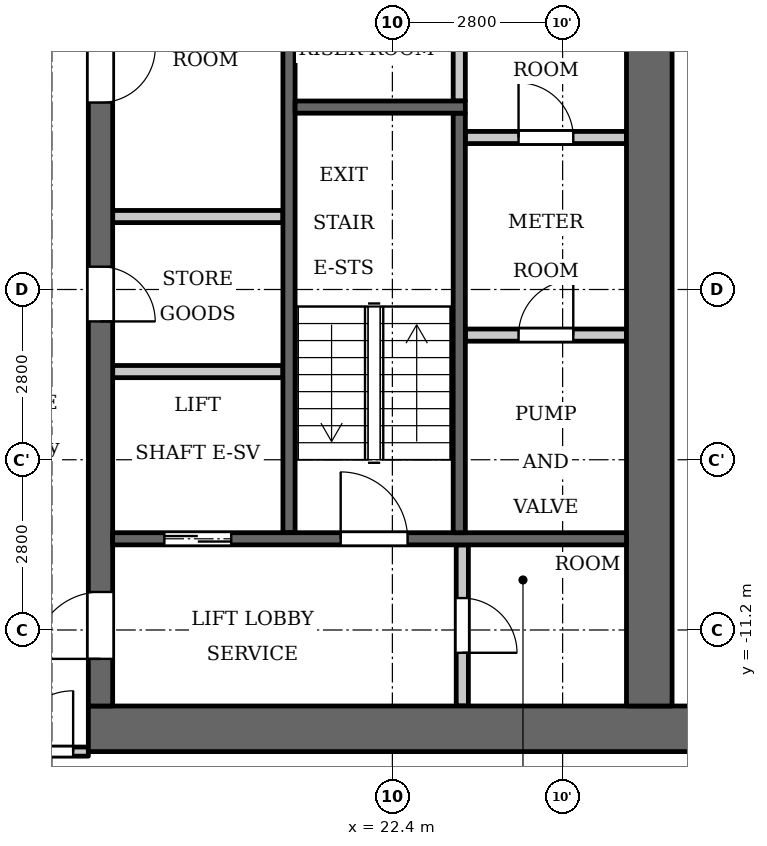
"""IFC4 building model, lengths in metres.
Left out: names, types, materials, properties, quantities, classifications, styles, units other than length and angle.
Written with IfcOpenShell. Run it as: python <this file> out.ifc"""

import sys

from ifc_helpers import new_model, si_unit, direction, frame, frame_2d, origin, place, context, subcontext, project, spatial, rectangle, extrude, element, fill, save


model = new_model("IFC4")
c1 = context("Model", 3, precision=1e-05, world=origin(), true_north=direction((0.0, 1.0)))
c2 = subcontext(c1, "Body", "Model", "MODEL_VIEW")
j1 = project(units=[si_unit("LENGTHUNIT", "METRE"), si_unit("PLANEANGLEUNIT", "RADIAN")], contexts=[c1])
p1 = place(None, origin())
s1 = spatial("IfcSite", under=j1, at=p1, CompositionType="ELEMENT")
p2 = place(p1, origin())
s2 = spatial("IfcBuilding", under=s1, at=p2, CompositionType="ELEMENT")
p3 = place(p2, frame((0.0, 0.0, 146.6)))
s3 = spatial("IfcBuildingStorey", under=s2, at=p3, CompositionType="ELEMENT", Elevation=146.6)
p4 = place(p3, frame((23.5, -2.5, 0.0), z_axis=(0.0, 0.0, 1.0), x_axis=(0.0, 1.0, 0.0)))
e1 = element("IfcWall", 1, at=p4, inside=s3, PredefinedType="PARTITIONING", context=c2, shape_type="SweptSolid", body=[
    extrude(rectangle(XDim=2.65, YDim=0.2, at=frame_2d((1.325, 0.0))), origin(), (0.0, 0.0, 1.0), 3.2),
])
p5 = place(p3, frame((20.7, -9.6, 0.0), z_axis=(0.0, 0.0, 1.0), x_axis=(0.0, 1.0, 0.0)))
e2 = element("IfcWall", 2, at=p5, inside=s3, PredefinedType="SHEAR", context=c2, shape_type="SweptSolid", body=[
    extrude(rectangle(XDim=9.75, YDim=0.2, at=frame_2d((4.875, 0.0))), origin(), (0.0, 0.0, 1.0), 3.2),
])
p6 = place(p3, frame((17.4, -12.825, 0.0), z_axis=(0.0, 0.0, 1.0), x_axis=(1.0, 0.0, 0.0)))
e3 = element("IfcWall", 3, at=p6, inside=s3, PredefinedType="SHEAR", context=c2, shape_type="SweptSolid", body=[
    extrude(rectangle(XDim=10.4, YDim=0.75, at=frame_2d((5.2, 0.0))), origin(), (0.0, 0.0, 1.0), 3.2),
])
p7 = place(p3, frame((17.8, -4.4, 0.0), z_axis=(0.0, 0.0, 1.0), x_axis=(1.0, 0.0, 0.0)))
e4 = element("IfcWall", 4, at=p7, inside=s3, PredefinedType="PARTITIONING", context=c2, shape_type="SweptSolid", body=[
    extrude(rectangle(XDim=2.8, YDim=0.2, at=frame_2d((1.4, 0.0))), origin(), (0.0, 0.0, 1.0), 3.2),
])
p8 = place(p3, frame((17.6, -12.45, 0.0), z_axis=(0.0, 0.0, 1.0), x_axis=(0.0, 1.0, 0.0)))
e5 = element("IfcWall", 5, at=p8, inside=s3, PredefinedType="SHEAR", context=c2, shape_type="SweptSolid", body=[
    extrude(rectangle(XDim=24.9, YDim=0.4, at=frame_2d((12.45, 0.0))), origin(), (0.0, 0.0, 1.0), 3.2),
])
p9 = place(p8, frame((6.325, 0.0, 0.0)))
e6 = element("IfcOpeningElement", 6, at=p9, cuts=e5, PredefinedType="OPENING", context=c2, shape_type="SweptSolid", body=[
    extrude(rectangle(XDim=0.9, YDim=2.1, at=frame_2d((0.45, 1.05))), frame((0.0, 0.21, 0.0), z_axis=(0.0, -1.0, 0.0), x_axis=(1.0, 0.0, 0.0)), (0.0, 0.0, 1.0), 0.42),
])
p10 = place(p8, frame((9.925, 0.0, 0.0)))
e7 = element("IfcOpeningElement", 7, at=p10, cuts=e5, PredefinedType="OPENING", context=c2, shape_type="SweptSolid", body=[
    extrude(rectangle(XDim=0.9, YDim=2.1, at=frame_2d((0.45, 1.05))), frame((0.0, 0.21, 0.0), z_axis=(0.0, -1.0, 0.0), x_axis=(1.0, 0.0, 0.0)), (0.0, 0.0, 1.0), 0.42),
])
p11 = place(p8, frame((15.6, 0.0, 0.0)))
e8 = element("IfcOpeningElement", 8, at=p11, cuts=e5, PredefinedType="OPENING", context=c2, shape_type="SweptSolid", body=[
    extrude(rectangle(XDim=1.1, YDim=2.1, at=frame_2d((0.55, 1.05))), frame((0.0, 0.21, 0.0), z_axis=(0.0, -1.0, 0.0), x_axis=(1.0, 0.0, 0.0)), (0.0, 0.0, 1.0), 0.42),
])
p12 = place(p8, frame((18.0, 0.0, 0.0)))
e9 = element("IfcOpeningElement", 9, at=p12, cuts=e5, PredefinedType="OPENING", context=c2, shape_type="SweptSolid", body=[
    extrude(rectangle(XDim=1.1, YDim=2.1, at=frame_2d((0.55, 1.05))), frame((0.0, 0.21, 0.0), z_axis=(0.0, -1.0, 0.0), x_axis=(1.0, 0.0, 0.0)), (0.0, 0.0, 1.0), 0.42),
])
p13 = place(p8, frame((23.025, 0.0, 0.0)))
e10 = element("IfcOpeningElement", 10, at=p13, cuts=e5, PredefinedType="OPENING", context=c2, shape_type="SweptSolid", body=[
    extrude(rectangle(XDim=1.1, YDim=2.1, at=frame_2d((0.55, 1.05))), frame((0.0, 0.21, 0.0), z_axis=(0.0, -1.0, 0.0), x_axis=(1.0, 0.0, 0.0)), (0.0, 0.0, 1.0), 0.42),
])
p14 = place(p8, frame((0.775, 0.0, 0.0)))
e11 = element("IfcOpeningElement", 11, at=p14, cuts=e5, PredefinedType="OPENING", context=c2, shape_type="SweptSolid", body=[
    extrude(rectangle(XDim=1.1, YDim=2.1, at=frame_2d((0.55, 1.05))), frame((0.0, 0.21, 0.0), z_axis=(0.0, -1.0, 0.0), x_axis=(1.0, 0.0, 0.0)), (0.0, 0.0, 1.0), 0.42),
])
p15 = place(p8, frame((12.925, 0.0, 0.0)))
e12 = element("IfcOpeningElement", 12, at=p15, cuts=e5, PredefinedType="OPENING", context=c2, shape_type="SweptSolid", body=[
    extrude(rectangle(XDim=1.8, YDim=2.1, at=frame_2d((0.9, 1.05))), frame((0.0, 0.21, 0.0), z_axis=(0.0, -1.0, 0.0), x_axis=(1.0, 0.0, 0.0)), (0.0, 0.0, 1.0), 0.42),
])
p16 = place(p3, frame((26.625, -12.45, 0.0), z_axis=(0.0, 0.0, 1.0), x_axis=(0.0, 1.0, 0.0)))
e13 = element("IfcWall", 13, at=p16, inside=s3, PredefinedType="SHEAR", context=c2, shape_type="SweptSolid", body=[
    extrude(rectangle(XDim=24.9, YDim=0.75, at=frame_2d((12.45, 0.0))), origin(), (0.0, 0.0, 1.0), 3.2),
])
p17 = place(p3, frame((23.55, -12.45, 0.0), z_axis=(0.0, 0.0, 1.0), x_axis=(0.0, 1.0, 0.0)))
e14 = element("IfcWall", 14, at=p17, inside=s3, PredefinedType="PARTITIONING", context=c2, shape_type="SweptSolid", body=[
    extrude(rectangle(XDim=2.65, YDim=0.2, at=frame_2d((1.325, 0.0))), origin(), (0.0, 0.0, 1.0), 3.2),
])
p18 = place(p17, frame((0.875, 0.0, 0.0)))
e15 = element("IfcOpeningElement", 15, at=p18, cuts=e14, PredefinedType="OPENING", context=c2, shape_type="SweptSolid", body=[
    extrude(rectangle(XDim=0.9, YDim=2.1, at=frame_2d((0.45, 1.05))), frame((0.0, 0.11, 0.0), z_axis=(0.0, -1.0, 0.0), x_axis=(1.0, 0.0, 0.0)), (0.0, 0.0, 1.0), 0.22),
])
p19 = place(p3, frame((23.6, -6.35, 0.0), z_axis=(0.0, 0.0, 1.0), x_axis=(1.0, 0.0, 0.0)))
e16 = element("IfcWall", 16, at=p19, inside=s3, PredefinedType="PARTITIONING", context=c2, shape_type="SweptSolid", body=[
    extrude(rectangle(XDim=2.65, YDim=0.2, at=frame_2d((1.325, 0.0))), origin(), (0.0, 0.0, 1.0), 3.2),
])
p20 = place(p19, frame((0.875, 0.0, 0.0)))
e17 = element("IfcOpeningElement", 17, at=p20, cuts=e16, PredefinedType="OPENING", context=c2, shape_type="SweptSolid", body=[
    extrude(rectangle(XDim=0.9, YDim=2.1, at=frame_2d((0.45, 1.05))), frame((0.0, 0.11, 0.0), z_axis=(0.0, -1.0, 0.0), x_axis=(1.0, 0.0, 0.0)), (0.0, 0.0, 1.0), 0.22),
])
p21 = place(p3, frame((23.6, -3.1, 0.0), z_axis=(0.0, 0.0, 1.0), x_axis=(1.0, 0.0, 0.0)))
e18 = element("IfcWall", 18, at=p21, inside=s3, PredefinedType="PARTITIONING", context=c2, shape_type="SweptSolid", body=[
    extrude(rectangle(XDim=2.65, YDim=0.2, at=frame_2d((1.325, 0.0))), origin(), (0.0, 0.0, 1.0), 3.2),
])
p22 = place(p21, frame((0.875, 0.0, 0.0)))
e19 = element("IfcOpeningElement", 19, at=p22, cuts=e18, PredefinedType="OPENING", context=c2, shape_type="SweptSolid", body=[
    extrude(rectangle(XDim=0.9, YDim=2.1, at=frame_2d((0.45, 1.05))), frame((0.0, 0.11, 0.0), z_axis=(0.0, -1.0, 0.0), x_axis=(1.0, 0.0, 0.0)), (0.0, 0.0, 1.0), 0.22),
])
p23 = place(p3, frame((17.8, -9.7, 0.0), z_axis=(0.0, 0.0, 1.0), x_axis=(1.0, 0.0, 0.0)))
e20 = element("IfcWall", 20, at=p23, inside=s3, PredefinedType="SHEAR", context=c2, shape_type="SweptSolid", body=[
    extrude(rectangle(XDim=8.45, YDim=0.2, at=frame_2d((4.225, 0.0))), origin(), (0.0, 0.0, 1.0), 3.2),
])
p24 = place(p23, frame((0.85, 0.0, 0.0)))
e21 = element("IfcOpeningElement", 21, at=p24, cuts=e20, PredefinedType="OPENING", context=c2, shape_type="SweptSolid", body=[
    extrude(rectangle(XDim=1.1, YDim=2.1, at=frame_2d((0.55, 1.05))), frame((0.0, 0.11, 0.0), z_axis=(0.0, -1.0, 0.0), x_axis=(1.0, 0.0, 0.0)), (0.0, 0.0, 1.0), 0.22),
])
p25 = place(p23, frame((3.75, 0.0, 0.0)))
e22 = element("IfcOpeningElement", 22, at=p25, cuts=e20, PredefinedType="OPENING", context=c2, shape_type="SweptSolid", body=[
    extrude(rectangle(XDim=1.1, YDim=2.1, at=frame_2d((0.55, 1.05))), frame((0.0, 0.11, 0.0), z_axis=(0.0, -1.0, 0.0), x_axis=(1.0, 0.0, 0.0)), (0.0, 0.0, 1.0), 0.22),
])
p26 = place(p3, frame((17.8, -6.95, 0.0), z_axis=(0.0, 0.0, 1.0), x_axis=(1.0, 0.0, 0.0)))
e23 = element("IfcWall", 23, at=p26, inside=s3, PredefinedType="PARTITIONING", context=c2, shape_type="SweptSolid", body=[
    extrude(rectangle(XDim=2.8, YDim=0.2, at=frame_2d((1.4, 0.0))), origin(), (0.0, 0.0, 1.0), 3.2),
])
p27 = place(p3, frame((23.5, -9.6, 0.0), z_axis=(0.0, 0.0, 1.0), x_axis=(0.0, 1.0, 0.0)))
e24 = element("IfcWall", 24, at=p27, inside=s3, PredefinedType="SHEAR", context=c2, shape_type="SweptSolid", body=[
    extrude(rectangle(XDim=6.9, YDim=0.2, at=frame_2d((3.45, 0.0))), origin(), (0.0, 0.0, 1.0), 3.2),
])
p28 = place(p3, frame((20.8, -2.6, 0.0), z_axis=(0.0, 0.0, 1.0), x_axis=(1.0, 0.0, 0.0)))
e25 = element("IfcWall", 25, at=p28, inside=s3, PredefinedType="SHEAR", context=c2, shape_type="SweptSolid", body=[
    extrude(rectangle(XDim=2.8, YDim=0.2, at=frame_2d((1.4, 0.0))), origin(), (0.0, 0.0, 1.0), 3.2),
])
p29 = place(p3, frame((-17.4, -13.2, 0.0), z_axis=(0.0, 0.0, 1.0), x_axis=(1.0, 0.0, 0.0)))
e26 = element("IfcWall", 26, at=p29, inside=s3, PredefinedType="PARTITIONING", context=c2, shape_type="SweptSolid", body=[
    extrude(rectangle(XDim=34.8, YDim=0.15, at=frame_2d((17.4, 0.0))), origin(), (0.0, 0.0, 1.0), 3.2),
])
p30 = place(p29, frame((0.15, 0.0, 0.0)))
e27 = element("IfcOpeningElement", 27, at=p30, cuts=e26, PredefinedType="OPENING", context=c2, shape_type="SweptSolid", body=[
    extrude(rectangle(XDim=1.0, YDim=2.1, at=frame_2d((0.5, 1.05))), frame((0.0, 0.085, 0.0), z_axis=(0.0, -1.0, 0.0), x_axis=(1.0, 0.0, 0.0)), (0.0, 0.0, 1.0), 0.17),
])
p31 = place(p29, frame((33.55, 0.0, 0.0)))
e28 = element("IfcOpeningElement", 28, at=p31, cuts=e26, PredefinedType="OPENING", context=c2, shape_type="SweptSolid", body=[
    extrude(rectangle(XDim=1.0, YDim=2.1, at=frame_2d((0.5, 1.05))), frame((0.0, 0.085, 0.0), z_axis=(0.0, -1.0, 0.0), x_axis=(1.0, 0.0, 0.0)), (0.0, 0.0, 1.0), 0.17),
])
p32 = place(p29, frame((15.7, 0.0, 0.0)))
e29 = element("IfcOpeningElement", 29, at=p32, cuts=e26, PredefinedType="OPENING", context=c2, shape_type="SweptSolid", body=[
    extrude(rectangle(XDim=1.0, YDim=2.1, at=frame_2d((0.5, 1.05))), frame((0.0, 0.085, 0.0), z_axis=(0.0, -1.0, 0.0), x_axis=(1.0, 0.0, 0.0)), (0.0, 0.0, 1.0), 0.17),
])
p33 = place(p24, origin())
e30 = element("IfcDoor", 30, at=p33, inside=s3, OperationType="DOUBLE_DOOR_SLIDING", PredefinedType="DOOR", context=c2, shape_type="SweptSolid", body=[
    extrude(rectangle(XDim=1.1, YDim=2.1, at=frame_2d((0.55, 1.05))), frame((0.0, 0.025, 0.0), z_axis=(0.0, -1.0, 0.0), x_axis=(1.0, 0.0, 0.0)), (0.0, 0.0, 1.0), 0.05),
])
fill(e21, e30)
p34 = place(p9, origin())
e31 = element("IfcDoor", 31, at=p34, inside=s3, OperationType="SINGLE_SWING_LEFT", PredefinedType="DOOR", context=c2, shape_type="SweptSolid", body=[
    extrude(rectangle(XDim=0.9, YDim=2.1, at=frame_2d((0.45, 1.05))), frame((0.0, 0.025, 0.0), z_axis=(0.0, -1.0, 0.0), x_axis=(1.0, 0.0, 0.0)), (0.0, 0.0, 1.0), 0.05),
])
fill(e6, e31)
p35 = place(p10, origin())
e32 = element("IfcDoor", 32, at=p35, inside=s3, OperationType="SINGLE_SWING_RIGHT", PredefinedType="DOOR", context=c2, shape_type="SweptSolid", body=[
    extrude(rectangle(XDim=0.9, YDim=2.1, at=frame_2d((0.45, 1.05))), frame((0.0, 0.025, 0.0), z_axis=(0.0, -1.0, 0.0), x_axis=(1.0, 0.0, 0.0)), (0.0, 0.0, 1.0), 0.05),
])
fill(e7, e32)
p36 = place(p14, origin())
e33 = element("IfcDoor", 33, at=p36, inside=s3, OperationType="SINGLE_SWING_RIGHT", PredefinedType="DOOR", context=c2, shape_type="SweptSolid", body=[
    extrude(rectangle(XDim=1.1, YDim=2.1, at=frame_2d((0.55, 1.05))), frame((0.0, 0.025, 0.0), z_axis=(0.0, -1.0, 0.0), x_axis=(1.0, 0.0, 0.0)), (0.0, 0.0, 1.0), 0.05),
])
fill(e11, e33)
p37 = place(p18, origin())
e34 = element("IfcDoor", 34, at=p37, inside=s3, OperationType="SINGLE_SWING_LEFT", PredefinedType="DOOR", context=c2, shape_type="SweptSolid", body=[
    extrude(rectangle(XDim=0.9, YDim=2.1, at=frame_2d((0.45, 1.05))), frame((0.0, 0.025, 0.0), z_axis=(0.0, -1.0, 0.0), x_axis=(1.0, 0.0, 0.0)), (0.0, 0.0, 1.0), 0.05),
])
fill(e15, e34)
p38 = place(p25, origin())
e35 = element("IfcDoor", 35, at=p38, inside=s3, OperationType="SINGLE_SWING_RIGHT", PredefinedType="DOOR", context=c2, shape_type="SweptSolid", body=[
    extrude(rectangle(XDim=1.1, YDim=2.1, at=frame_2d((0.55, 1.05))), frame((0.0, 0.025, 0.0), z_axis=(0.0, -1.0, 0.0), x_axis=(1.0, 0.0, 0.0)), (0.0, 0.0, 1.0), 0.05),
])
fill(e22, e35)
p39 = place(p20, origin())
e36 = element("IfcDoor", 36, at=p39, inside=s3, OperationType="SINGLE_SWING_LEFT", PredefinedType="DOOR", context=c2, shape_type="SweptSolid", body=[
    extrude(rectangle(XDim=0.9, YDim=2.1, at=frame_2d((0.45, 1.05))), frame((0.0, 0.025, 0.0), z_axis=(0.0, -1.0, 0.0), x_axis=(1.0, 0.0, 0.0)), (0.0, 0.0, 1.0), 0.05),
])
fill(e17, e36)
p40 = place(p22, origin())
e37 = element("IfcDoor", 37, at=p40, inside=s3, OperationType="SINGLE_SWING_RIGHT", PredefinedType="DOOR", context=c2, shape_type="SweptSolid", body=[
    extrude(rectangle(XDim=0.9, YDim=2.1, at=frame_2d((0.45, 1.05))), frame((0.0, 0.025, 0.0), z_axis=(0.0, -1.0, 0.0), x_axis=(1.0, 0.0, 0.0)), (0.0, 0.0, 1.0), 0.05),
])
fill(e19, e37)
p41 = place(p31, origin())
e38 = element("IfcDoor", 38, at=p41, inside=s3, OperationType="SINGLE_SWING_LEFT", PredefinedType="DOOR", context=c2, shape_type="SweptSolid", body=[
    extrude(rectangle(XDim=1.0, YDim=2.1, at=frame_2d((0.5, 1.05))), frame((0.0, 0.025, 0.0), z_axis=(0.0, -1.0, 0.0), x_axis=(1.0, 0.0, 0.0)), (0.0, 0.0, 1.0), 0.05),
])
fill(e28, e38)
save(model, sys.argv[1])
